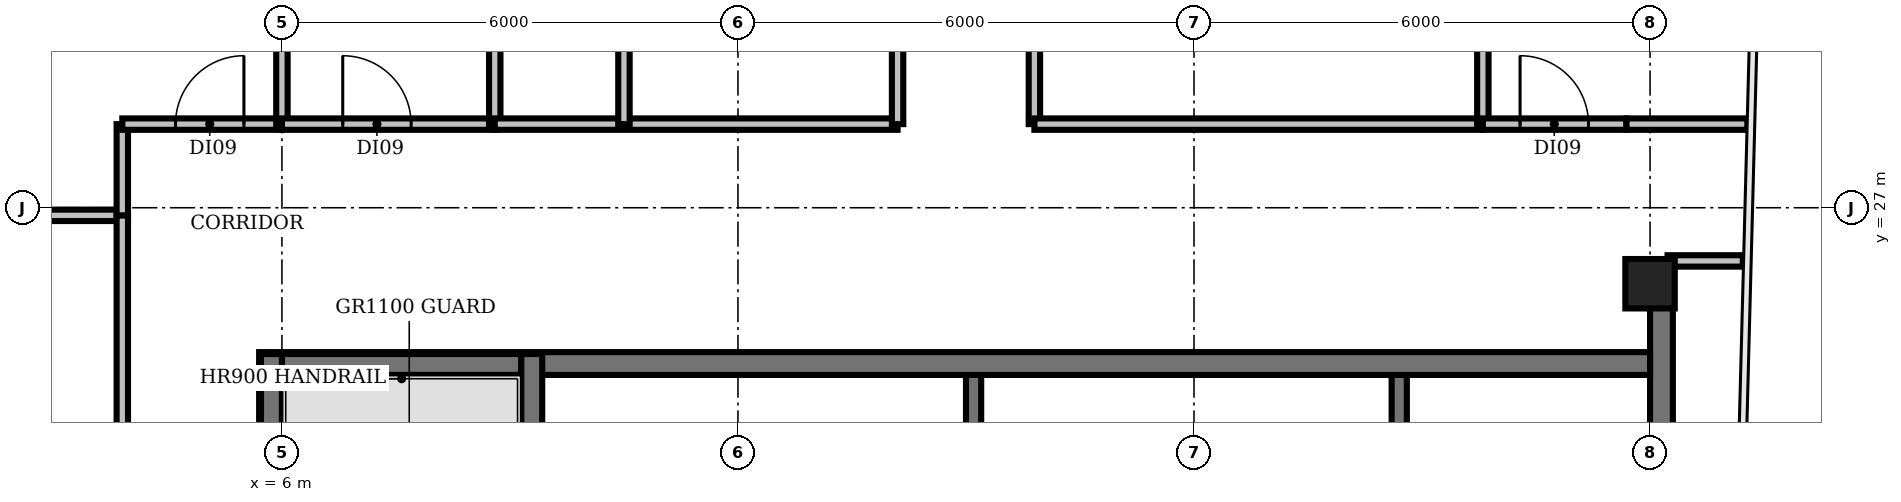
"""IFC4 building model, lengths in metres.
Left out: names, types, materials, properties, quantities, classifications, styles, units other than length and angle.
Written with IfcOpenShell. Run it as: python <this file> out.ifc"""

import sys

from ifc_helpers import new_model, si_unit, direction, frame, frame_2d, origin, origin_2d, place, context, subcontext, project, spatial, rectangle, extrude, element, fill, save


model = new_model("IFC4")
c1 = context("Model", 3, precision=1e-05, world=origin(), true_north=direction((0.0, 1.0)))
c2 = subcontext(c1, "Body", "Model", "MODEL_VIEW")
j1 = project(units=[si_unit("LENGTHUNIT", "METRE"), si_unit("PLANEANGLEUNIT", "RADIAN")], contexts=[c1])
p1 = place(None, origin())
s1 = spatial("IfcSite", under=j1, at=p1, CompositionType="ELEMENT")
p2 = place(p1, origin())
s2 = spatial("IfcBuilding", under=s1, at=p2, CompositionType="ELEMENT")
p3 = place(p2, frame((0.0, 0.0, 339.8)))
s3 = spatial("IfcBuildingStorey", under=s2, at=p3, CompositionType="ELEMENT", Elevation=339.8)
p4 = place(p3, frame((24.0, 26.0, 0.0), z_axis=(0.0, 0.0, 1.0), x_axis=(1.0, 0.0, 0.0)))
e1 = element("IfcColumn", 1, at=p4, inside=s3, PredefinedType="COLUMN", context=c2, shape_type="SweptSolid", body=[
    extrude(rectangle(XDim=0.65, YDim=0.65, at=origin_2d()), origin(), (0.0, 0.0, 1.0), 3.9),
])
p5 = place(p3, frame((9.275, 18.375, 0.0), z_axis=(0.0, 0.0, 1.0), x_axis=(0.0, 1.0, 0.0)))
e2 = element("IfcWall", 2, at=p5, inside=s3, PredefinedType="SHEAR", context=c2, shape_type="SweptSolid", body=[
    extrude(rectangle(XDim=6.425, YDim=0.25, at=frame_2d((3.212, 0.0))), origin(), (0.0, 0.0, 1.0), 3.9),
])
for number, where, z_axis, x_axis in (
    (3, (15.1, 22.9, 0.0), (0.0, 0.0, 1.0), (0.0, 1.0, 0.0)),
    (4, (20.7, 22.9, 0.0), (0.0, 0.0, 1.0), (0.0, 1.0, 0.0)),
):
    element("IfcWall", number, at=place(p3, frame(where, z_axis=z_axis, x_axis=x_axis)), inside=s3, PredefinedType="SHEAR", context=c2, shape_type="SweptSolid", body=[
        extrude(rectangle(XDim=1.9, YDim=0.2, at=frame_2d((0.95, 0.0))), origin(), (0.0, 0.0, 1.0), 3.9),
    ])
p6 = place(p3, frame((5.85, 5.1, 0.0), z_axis=(0.0, 0.0, 1.0), x_axis=(0.0, 1.0, 0.0)))
e5 = element("IfcWall", 5, at=p6, inside=s3, PredefinedType="SHEAR", context=c2, shape_type="SweptSolid", body=[
    extrude(rectangle(XDim=20.0, YDim=0.3, at=frame_2d((10.0, 0.0))), origin(), (0.0, 0.0, 1.0), 3.9),
])
p7 = place(p6, frame((0.55, 0.0, 0.0)))
e6 = element("IfcOpeningElement", 6, at=p7, cuts=e5, PredefinedType="OPENING", context=c2, shape_type="SweptSolid", body=[
    extrude(rectangle(XDim=1.5, YDim=2.1, at=frame_2d((0.75, 1.05))), frame((0.0, 0.16, 0.0), z_axis=(0.0, -1.0, 0.0), x_axis=(1.0, 0.0, 0.0)), (0.0, 0.0, 1.0), 0.32),
])
p8 = place(p6, frame((7.0, 0.0, 0.0)))
e7 = element("IfcOpeningElement", 7, at=p8, cuts=e5, PredefinedType="OPENING", context=c2, shape_type="SweptSolid", body=[
    extrude(rectangle(XDim=1.2, YDim=2.1, at=frame_2d((0.6, 1.05))), frame((0.0, 0.16, 0.0), z_axis=(0.0, -1.0, 0.0), x_axis=(1.0, 0.0, 0.0)), (0.0, 0.0, 1.0), 0.32),
])
p9 = place(p6, frame((13.55, 0.0, 0.0)))
e8 = element("IfcOpeningElement", 8, at=p9, cuts=e5, PredefinedType="OPENING", context=c2, shape_type="SweptSolid", body=[
    extrude(rectangle(XDim=1.2, YDim=2.1, at=frame_2d((0.6, 1.05))), frame((0.0, 0.16, 0.0), z_axis=(0.0, -1.0, 0.0), x_axis=(1.0, 0.0, 0.0)), (0.0, 0.0, 1.0), 0.32),
])
p10 = place(p3, frame((24.15, 25.705, 0.0), z_axis=(0.0, 0.0, 1.0), x_axis=(0.0, -1.0, 0.0)))
e9 = element("IfcWall", 9, at=p10, inside=s3, PredefinedType="SHEAR", context=c2, shape_type="SweptSolid", body=[
    extrude(rectangle(XDim=20.605, YDim=0.3, at=frame_2d((10.302, 0.0))), origin(), (0.0, 0.0, 1.0), 3.9),
])
p11 = place(p10, frame((18.555, 0.0, 0.0)))
e10 = element("IfcOpeningElement", 10, at=p11, cuts=e9, PredefinedType="OPENING", context=c2, shape_type="SweptSolid", body=[
    extrude(rectangle(XDim=1.5, YDim=2.1, at=frame_2d((0.75, 1.05))), frame((0.0, 0.16, 0.0), z_axis=(0.0, -1.0, 0.0), x_axis=(1.0, 0.0, 0.0)), (0.0, 0.0, 1.0), 0.32),
])
p12 = place(p10, frame((12.455, 0.0, 0.0)))
e11 = element("IfcOpeningElement", 11, at=p12, cuts=e9, PredefinedType="OPENING", context=c2, shape_type="SweptSolid", body=[
    extrude(rectangle(XDim=0.9, YDim=2.1, at=frame_2d((0.45, 1.05))), frame((0.0, 0.16, 0.0), z_axis=(0.0, -1.0, 0.0), x_axis=(1.0, 0.0, 0.0)), (0.0, 0.0, 1.0), 0.32),
])
p13 = place(p10, frame((6.455, 0.0, 0.0)))
e12 = element("IfcOpeningElement", 12, at=p13, cuts=e9, PredefinedType="OPENING", context=c2, shape_type="SweptSolid", body=[
    extrude(rectangle(XDim=2.0, YDim=2.1, at=frame_2d((1.0, 1.05))), frame((0.0, 0.16, 0.0), z_axis=(0.0, -1.0, 0.0), x_axis=(1.0, 0.0, 0.0)), (0.0, 0.0, 1.0), 0.32),
])
p14 = place(p3, frame((6.0, 24.95, 0.0), z_axis=(0.0, 0.0, 1.0), x_axis=(1.0, 0.0, 0.0)))
e13 = element("IfcWall", 13, at=p14, inside=s3, PredefinedType="SHEAR", context=c2, shape_type="SweptSolid", body=[
    extrude(rectangle(XDim=18.0, YDim=0.3, at=frame_2d((9.0, 0.0))), origin(), (0.0, 0.0, 1.0), 3.9),
])
p15 = place(p3, frame((6.0, 24.938, 4.2), z_axis=(0.0, 0.0, 1.0), x_axis=(1.0, 0.0, 0.0)))
e14 = element("IfcWall", 14, at=p15, inside=s3, PredefinedType="SHEAR", context=c2, shape_type="SweptSolid", body=[
    extrude(rectangle(XDim=3.15, YDim=0.275, at=frame_2d((1.575, 0.0))), origin(), (0.0, 0.0, 1.0), 3.0),
])
p16 = place(p3, frame((5.862, 5.125, 4.2), z_axis=(0.0, 0.0, 1.0), x_axis=(0.0, 1.0, 0.0)))
e15 = element("IfcWall", 15, at=p16, inside=s3, PredefinedType="SHEAR", context=c2, shape_type="SweptSolid", body=[
    extrude(rectangle(XDim=19.95, YDim=0.275, at=frame_2d((9.975, 0.0))), origin(), (0.0, 0.0, 1.0), 3.0),
])
p17 = place(p16, frame((6.975, 0.0, 0.0)))
e16 = element("IfcOpeningElement", 16, at=p17, cuts=e15, PredefinedType="OPENING", context=c2, shape_type="SweptSolid", body=[
    extrude(rectangle(XDim=1.2, YDim=2.1, at=frame_2d((0.6, 1.05))), frame((0.0, 0.147, 0.0), z_axis=(0.0, -1.0, 0.0), x_axis=(1.0, 0.0, 0.0)), (0.0, 0.0, 1.0), 0.295),
])
p18 = place(p16, frame((13.525, 0.0, 0.0)))
e17 = element("IfcOpeningElement", 17, at=p18, cuts=e15, PredefinedType="OPENING", context=c2, shape_type="SweptSolid", body=[
    extrude(rectangle(XDim=1.2, YDim=2.1, at=frame_2d((0.6, 1.05))), frame((0.0, 0.147, 0.0), z_axis=(0.0, -1.0, 0.0), x_axis=(1.0, 0.0, 0.0)), (0.0, 0.0, 1.0), 0.295),
])
p19 = place(p3, frame((9.287, 5.125, 4.2), z_axis=(0.0, 0.0, 1.0), x_axis=(0.0, 1.0, 0.0)))
e18 = element("IfcWall", 18, at=p19, inside=s3, PredefinedType="SHEAR", context=c2, shape_type="SweptSolid", body=[
    extrude(rectangle(XDim=19.95, YDim=0.275, at=frame_2d((9.975, 0.0))), origin(), (0.0, 0.0, 1.0), 3.0),
])
p20 = place(p3, frame((-0.98, 26.9, 0.0), z_axis=(0.0, 0.0, 1.0), x_axis=(1.0, 0.0, 0.0)))
e19 = element("IfcWall", 19, at=p20, inside=s3, PredefinedType="PARTITIONING", context=c2, shape_type="SweptSolid", body=[
    extrude(rectangle(XDim=4.88, YDim=0.15, at=frame_2d((2.44, 0.0))), origin(), (0.0, 0.0, 1.0), 2.95),
])
p21 = place(p3, frame((3.9, 22.5, 0.0), z_axis=(0.0, 0.0, 1.0), x_axis=(0.0, 1.0, 0.0)))
e20 = element("IfcWall", 20, at=p21, inside=s3, PredefinedType="PARTITIONING", context=c2, shape_type="SweptSolid", body=[
    extrude(rectangle(XDim=4.4, YDim=0.15, at=frame_2d((2.2, 0.0))), origin(), (0.0, 0.0, 1.0), 2.95),
])
p22 = place(p3, frame((3.9, 26.9, 0.0), z_axis=(0.0, 0.0, 1.0), x_axis=(0.0, 1.0, 0.0)))
e21 = element("IfcWall", 21, at=p22, inside=s3, PredefinedType="PARTITIONING", context=c2, shape_type="SweptSolid", body=[
    extrude(rectangle(XDim=1.2, YDim=0.15, at=frame_2d((0.6, 0.0))), origin(), (0.0, 0.0, 1.0), 2.95),
])
p23 = place(p3, frame((3.9, 28.1, 0.0), z_axis=(0.0, 0.0, 1.0), x_axis=(1.0, 0.0, 0.0)))
e22 = element("IfcWall", 22, at=p23, inside=s3, PredefinedType="PARTITIONING", context=c2, shape_type="SweptSolid", body=[
    extrude(rectangle(XDim=2.1, YDim=0.15, at=frame_2d((1.05, 0.0))), origin(), (0.0, 0.0, 1.0), 2.95),
])
p24 = place(p23, frame((0.7, 0.0, 0.0)))
e23 = element("IfcOpeningElement", 23, at=p24, cuts=e22, PredefinedType="OPENING", context=c2, shape_type="SweptSolid", body=[
    extrude(rectangle(XDim=0.9, YDim=2.1, at=frame_2d((0.45, 1.05))), frame((0.0, 0.085, 0.0), z_axis=(0.0, -1.0, 0.0), x_axis=(1.0, 0.0, 0.0)), (0.0, 0.0, 1.0), 0.17),
])
p25 = place(p3, frame((6.0, 28.1, 0.0), z_axis=(0.0, 0.0, 1.0), x_axis=(0.0, 1.0, 0.0)))
e24 = element("IfcWall", 24, at=p25, inside=s3, PredefinedType="PARTITIONING", context=c2, shape_type="SweptSolid", body=[
    extrude(rectangle(XDim=3.53, YDim=0.15, at=frame_2d((1.765, 0.0))), origin(), (0.0, 0.0, 1.0), 2.95),
])
p26 = place(p3, frame((6.0, 28.1, 0.0), z_axis=(0.0, 0.0, 1.0), x_axis=(1.0, 0.0, 0.0)))
e25 = element("IfcWall", 25, at=p26, inside=s3, PredefinedType="PARTITIONING", context=c2, shape_type="SweptSolid", body=[
    extrude(rectangle(XDim=2.8, YDim=0.15, at=frame_2d((1.4, 0.0))), origin(), (0.0, 0.0, 1.0), 2.95),
])
p27 = place(p26, frame((0.8, 0.0, 0.0)))
e26 = element("IfcOpeningElement", 26, at=p27, cuts=e25, PredefinedType="OPENING", context=c2, shape_type="SweptSolid", body=[
    extrude(rectangle(XDim=0.9, YDim=2.1, at=frame_2d((0.45, 1.05))), frame((0.0, 0.085, 0.0), z_axis=(0.0, -1.0, 0.0), x_axis=(1.0, 0.0, 0.0)), (0.0, 0.0, 1.0), 0.17),
])
p28 = place(p3, frame((8.8, 28.1, 0.0), z_axis=(0.0, 0.0, 1.0), x_axis=(0.0, 1.0, 0.0)))
e27 = element("IfcWall", 27, at=p28, inside=s3, PredefinedType="PARTITIONING", context=c2, shape_type="SweptSolid", body=[
    extrude(rectangle(XDim=4.8, YDim=0.15, at=frame_2d((2.4, 0.0))), origin(), (0.0, 0.0, 1.0), 2.95),
])
p29 = place(p3, frame((8.8, 28.1, 0.0), z_axis=(0.0, 0.0, 1.0), x_axis=(1.0, 0.0, 0.0)))
e28 = element("IfcWall", 28, at=p29, inside=s3, PredefinedType="PARTITIONING", context=c2, shape_type="SweptSolid", body=[
    extrude(rectangle(XDim=5.3, YDim=0.15, at=frame_2d((2.65, 0.0))), origin(), (0.0, 0.0, 1.0), 2.95),
])
p30 = place(p3, frame((10.5, 28.1, 0.0), z_axis=(0.0, 0.0, 1.0), x_axis=(0.0, 1.0, 0.0)))
e29 = element("IfcWall", 29, at=p30, inside=s3, PredefinedType="PARTITIONING", context=c2, shape_type="SweptSolid", body=[
    extrude(rectangle(XDim=4.8, YDim=0.15, at=frame_2d((2.4, 0.0))), origin(), (0.0, 0.0, 1.0), 2.95),
])
p31 = place(p3, frame((14.1, 28.1, 0.0), z_axis=(0.0, 0.0, 1.0), x_axis=(0.0, 1.0, 0.0)))
e30 = element("IfcWall", 30, at=p31, inside=s3, PredefinedType="PARTITIONING", context=c2, shape_type="SweptSolid", body=[
    extrude(rectangle(XDim=4.8, YDim=0.15, at=frame_2d((2.4, 0.0))), origin(), (0.0, 0.0, 1.0), 2.95),
])
p32 = place(p31, frame((1.9, 0.0, 0.0)))
e31 = element("IfcOpeningElement", 31, at=p32, cuts=e30, PredefinedType="OPENING", context=c2, shape_type="SweptSolid", body=[
    extrude(rectangle(XDim=0.9, YDim=2.1, at=frame_2d((0.45, 1.05))), frame((0.0, 0.085, 0.0), z_axis=(0.0, -1.0, 0.0), x_axis=(1.0, 0.0, 0.0)), (0.0, 0.0, 1.0), 0.17),
])
p33 = place(p3, frame((15.9, 28.1, 0.0), z_axis=(0.0, 0.0, 1.0), x_axis=(0.0, 1.0, 0.0)))
e32 = element("IfcWall", 32, at=p33, inside=s3, PredefinedType="PARTITIONING", context=c2, shape_type="SweptSolid", body=[
    extrude(rectangle(XDim=4.8, YDim=0.15, at=frame_2d((2.4, 0.0))), origin(), (0.0, 0.0, 1.0), 2.95),
])
p34 = place(p3, frame((15.9, 28.1, 0.0), z_axis=(0.0, 0.0, 1.0), x_axis=(1.0, 0.0, 0.0)))
e33 = element("IfcWall", 33, at=p34, inside=s3, PredefinedType="PARTITIONING", context=c2, shape_type="SweptSolid", body=[
    extrude(rectangle(XDim=5.9, YDim=0.15, at=frame_2d((2.95, 0.0))), origin(), (0.0, 0.0, 1.0), 2.95),
])
p35 = place(p3, frame((21.8, 28.1, 0.0), z_axis=(0.0, 0.0, 1.0), x_axis=(0.0, 1.0, 0.0)))
e34 = element("IfcWall", 34, at=p35, inside=s3, PredefinedType="PARTITIONING", context=c2, shape_type="SweptSolid", body=[
    extrude(rectangle(XDim=4.8, YDim=0.15, at=frame_2d((2.4, 0.0))), origin(), (0.0, 0.0, 1.0), 2.95),
])
p36 = place(p3, frame((21.8, 28.1, 0.0), z_axis=(0.0, 0.0, 1.0), x_axis=(1.0, 0.0, 0.0)))
e35 = element("IfcWall", 35, at=p36, inside=s3, PredefinedType="PARTITIONING", context=c2, shape_type="SweptSolid", body=[
    extrude(rectangle(XDim=1.89, YDim=0.15, at=frame_2d((0.945, 0.0))), origin(), (0.0, 0.0, 1.0), 2.95),
])
p37 = place(p36, frame((0.49, 0.0, 0.0)))
e36 = element("IfcOpeningElement", 36, at=p37, cuts=e35, PredefinedType="OPENING", context=c2, shape_type="SweptSolid", body=[
    extrude(rectangle(XDim=0.9, YDim=2.1, at=frame_2d((0.45, 1.05))), frame((0.0, 0.085, 0.0), z_axis=(0.0, -1.0, 0.0), x_axis=(1.0, 0.0, 0.0)), (0.0, 0.0, 1.0), 0.17),
])
p38 = place(p3, frame((23.69, 28.1, 0.0), z_axis=(0.0, 0.0, 1.0), x_axis=(1.0, 0.0, 0.0)))
e37 = element("IfcWall", 37, at=p38, inside=s3, PredefinedType="PARTITIONING", context=c2, shape_type="SweptSolid", body=[
    extrude(rectangle(XDim=1.59, YDim=0.15, at=frame_2d((0.795, 0.0))), origin(), (0.0, 0.0, 1.0), 2.95),
])
p39 = place(p3, frame((24.23, 26.3, 0.0), z_axis=(0.0, 0.0, 1.0), x_axis=(1.0, 0.0, 0.0)))
e38 = element("IfcWall", 38, at=p39, inside=s3, PredefinedType="PARTITIONING", context=c2, shape_type="SweptSolid", body=[
    extrude(rectangle(XDim=0.99, YDim=0.15, at=frame_2d((0.495, 0.0))), origin(), (0.0, 0.0, 1.0), 2.95),
])
p40 = place(p24, origin())
e39 = element("IfcDoor", 39, at=p40, inside=s3, OperationType="SINGLE_SWING_RIGHT", PredefinedType="DOOR", context=c2, shape_type="SweptSolid", body=[
    extrude(rectangle(XDim=0.9, YDim=2.1, at=frame_2d((0.45, 1.05))), frame((0.0, 0.025, 0.0), z_axis=(0.0, -1.0, 0.0), x_axis=(1.0, 0.0, 0.0)), (0.0, 0.0, 1.0), 0.05),
])
fill(e23, e39)
p41 = place(p27, origin())
e40 = element("IfcDoor", 40, at=p41, inside=s3, OperationType="SINGLE_SWING_LEFT", PredefinedType="DOOR", context=c2, shape_type="SweptSolid", body=[
    extrude(rectangle(XDim=0.9, YDim=2.1, at=frame_2d((0.45, 1.05))), frame((0.0, 0.025, 0.0), z_axis=(0.0, -1.0, 0.0), x_axis=(1.0, 0.0, 0.0)), (0.0, 0.0, 1.0), 0.05),
])
fill(e26, e40)
p42 = place(p37, origin())
e41 = element("IfcDoor", 41, at=p42, inside=s3, OperationType="SINGLE_SWING_LEFT", PredefinedType="DOOR", context=c2, shape_type="SweptSolid", body=[
    extrude(rectangle(XDim=0.9, YDim=2.1, at=frame_2d((0.45, 1.05))), frame((0.0, 0.025, 0.0), z_axis=(0.0, -1.0, 0.0), x_axis=(1.0, 0.0, 0.0)), (0.0, 0.0, 1.0), 0.05),
])
fill(e36, e41)
save(model, sys.argv[1])
